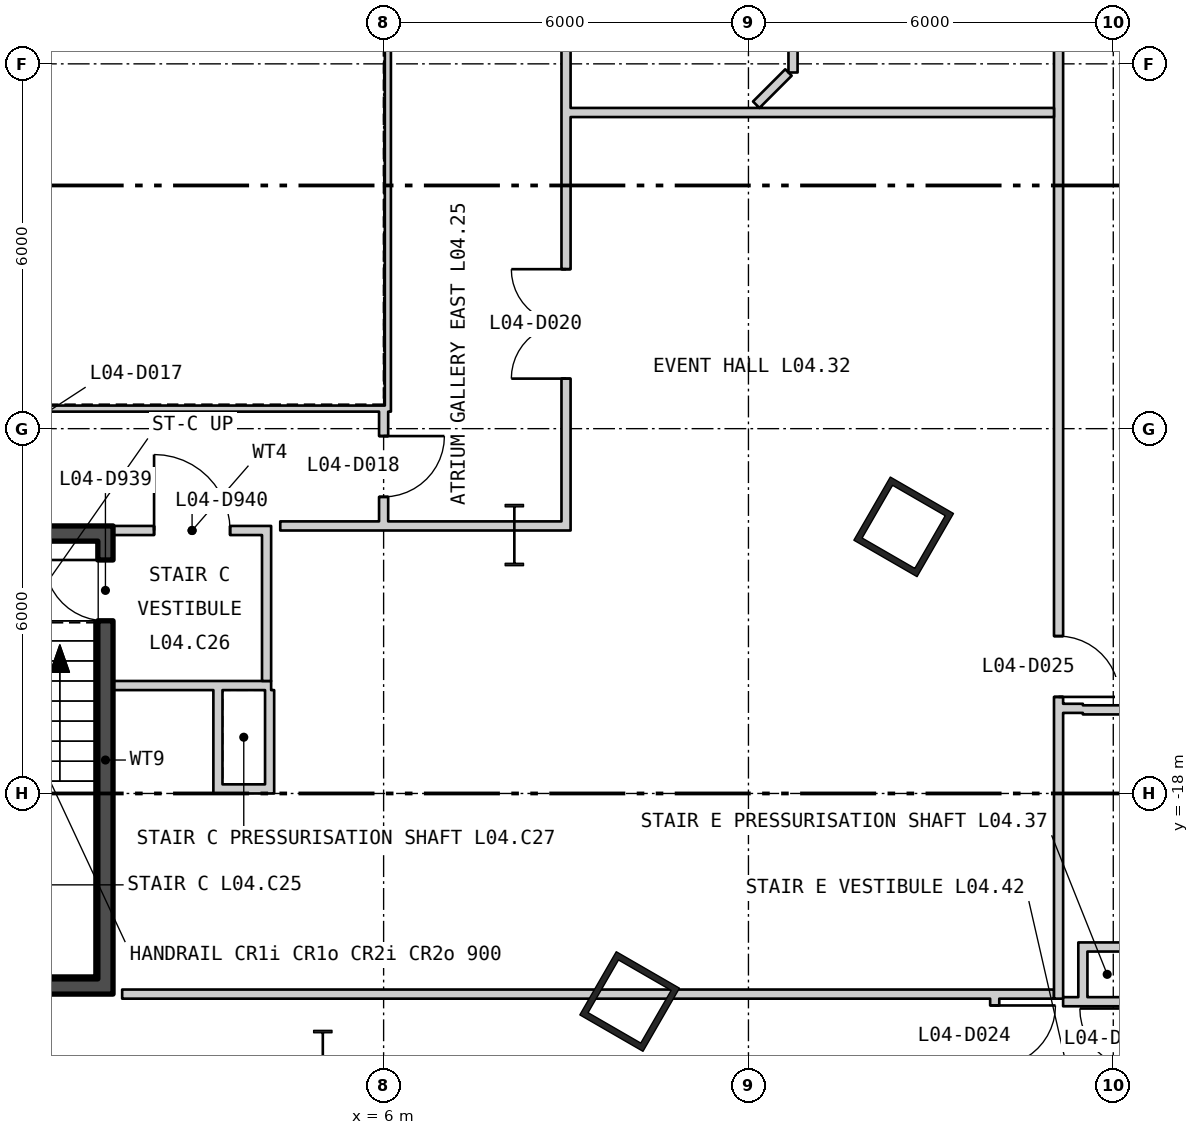
"""IFC4 building model, lengths in metres.
Left out: names, types, materials, properties, quantities, classifications, styles, units other than length and angle.
Written with IfcOpenShell. Run it as: python <this file> out.ifc"""

import sys

from ifc_helpers import new_model, si_unit, direction, frame, frame_2d, origin, origin_2d, place, context, subcontext, project, spatial, rectangle, hollow_rectangle, i_section, extrude, element, fill, save


model = new_model("IFC4")
c1 = context("Model", 3, precision=1e-05, world=origin(), true_north=direction((0.0, 1.0)))
c2 = subcontext(c1, "Body", "Model", "MODEL_VIEW")
j1 = project(units=[si_unit("LENGTHUNIT", "METRE"), si_unit("PLANEANGLEUNIT", "RADIAN")], contexts=[c1])
p1 = place(None, origin())
s1 = spatial("IfcSite", under=j1, at=p1, CompositionType="ELEMENT")
p2 = place(p1, origin())
s2 = spatial("IfcBuilding", under=s1, at=p2, CompositionType="ELEMENT")
p3 = place(p2, frame((0.0, 0.0, 23.7)))
s3 = spatial("IfcBuildingStorey", under=s2, at=p3, CompositionType="ELEMENT", Elevation=23.7)
for number, where, z_axis, x_axis in (
    (1, (10.046, -21.422, 0.0), (0.0, 0.0, 1.0), (0.5, 0.866, 0.0)),
    (2, (14.553, -13.615, 0.0), (0.0, 0.0, 1.0), (0.5, 0.866, 0.0)),
):
    element("IfcColumn", number, at=place(p3, frame(where, z_axis=z_axis, x_axis=x_axis)), inside=s3, PredefinedType="COLUMN", context=c2, shape_type="SweptSolid", body=[
        extrude(hollow_rectangle(XDim=1.2, YDim=1.2, WallThickness=0.1, at=origin_2d()), origin(), (0.0, 0.0, 1.0), 5.1),
    ])
for number, where, z_axis, x_axis in (
    (3, (8.15, -13.75, 0.0), (0.0, 0.0, 1.0), (1.0, 0.0, 0.0)),
    (4, (5.0, -22.4, 0.0), (0.0, 0.0, 1.0), (1.0, 0.0, 0.0)),
):
    element("IfcColumn", number, at=place(p3, frame(where, z_axis=z_axis, x_axis=x_axis)), inside=s3, PredefinedType="COLUMN", context=c2, shape_type="SweptSolid", body=[
        extrude(i_section(OverallWidth=0.302, OverallDepth=1.008, WebThickness=0.021, FlangeThickness=0.04, at=origin_2d()), origin(), (0.0, 0.0, 1.0), 5.1),
    ])
p4 = place(p3, frame((-6.12, -11.67, 0.0), z_axis=(0.0, 0.0, 1.0), x_axis=(1.0, 0.0, 0.0)))
e5 = element("IfcWall", 5, at=p4, inside=s3, PredefinedType="PARTITIONING", context=c2, shape_type="SweptSolid", body=[
    extrude(rectangle(XDim=12.24, YDim=0.1, at=frame_2d((6.12, 0.0))), origin(), (0.0, 0.0, 1.0), 4.85),
])
p5 = place(p3, frame((6.07, -11.62, 0.0), z_axis=(0.0, 0.0, 1.0), x_axis=(0.0, 1.0, 0.0)))
e6 = element("IfcWall", 6, at=p5, inside=s3, PredefinedType="PARTITIONING", context=c2, shape_type="SweptSolid", body=[
    extrude(rectangle(XDim=8.04, YDim=0.1, at=frame_2d((4.02, 0.0))), origin(), (0.0, 0.0, 1.0), 4.85),
])
p6 = place(p3, frame((1.425, -21.05, 0.0), z_axis=(0.0, 0.0, 1.0), x_axis=(0.0, 1.0, 0.0)))
e7 = element("IfcWall", 7, at=p6, inside=s3, PredefinedType="SHEAR", context=c2, shape_type="SweptSolid", body=[
    extrude(rectangle(XDim=7.2, YDim=0.25, at=frame_2d((3.6, 0.0))), origin(), (0.0, 0.0, 1.0), 4.85),
])
p7 = place(p6, frame((5.89, 0.0, 0.0)))
e8 = element("IfcOpeningElement", 8, at=p7, cuts=e7, PredefinedType="OPENING", context=c2, shape_type="SweptSolid", body=[
    extrude(rectangle(XDim=1.0, YDim=2.1, at=frame_2d((0.5, 1.05))), frame((0.0, 0.135, 0.0), z_axis=(0.0, -1.0, 0.0), x_axis=(1.0, 0.0, 0.0)), (0.0, 0.0, 1.0), 0.27),
])
for number, where, z_axis, x_axis in (
    (9, (-1.55, -21.175, 0.0), (0.0, 0.0, 1.0), (1.0, 0.0, 0.0)),
    (10, (-1.55, -13.725, 0.0), (0.0, 0.0, 1.0), (1.0, 0.0, 0.0)),
):
    element("IfcWall", number, at=place(p3, frame(where, z_axis=z_axis, x_axis=x_axis)), inside=s3, PredefinedType="SHEAR", context=c2, shape_type="SweptSolid", body=[
        extrude(rectangle(XDim=3.1, YDim=0.25, at=frame_2d((1.55, 0.0))), origin(), (0.0, 0.0, 1.0), 4.85),
    ])
p8 = place(p3, frame((1.55, -16.225, 0.0), z_axis=(0.0, 0.0, 1.0), x_axis=(1.0, 0.0, 0.0)))
e11 = element("IfcWall", 11, at=p8, inside=s3, PredefinedType="PARTITIONING", context=c2, shape_type="SweptSolid", body=[
    extrude(rectangle(XDim=2.6, YDim=0.15, at=frame_2d((1.3, 0.0))), origin(), (0.0, 0.0, 1.0), 4.85),
])
p9 = place(p3, frame((4.075, -16.15, 0.0), z_axis=(0.0, 0.0, 1.0), x_axis=(0.0, 1.0, 0.0)))
e12 = element("IfcWall", 12, at=p9, inside=s3, PredefinedType="PARTITIONING", context=c2, shape_type="SweptSolid", body=[
    extrude(rectangle(XDim=2.4, YDim=0.15, at=frame_2d((1.2, 0.0))), origin(), (0.0, 0.0, 1.0), 4.85),
])
p10 = place(p3, frame((1.55, -13.675, 0.0), z_axis=(0.0, 0.0, 1.0), x_axis=(1.0, 0.0, 0.0)))
e13 = element("IfcWall", 13, at=p10, inside=s3, PredefinedType="PARTITIONING", context=c2, shape_type="SweptSolid", body=[
    extrude(rectangle(XDim=2.6, YDim=0.15, at=frame_2d((1.3, 0.0))), origin(), (0.0, 0.0, 1.0), 3.94),
])
p11 = place(p10, frame((0.675, 0.0, 0.0)))
e14 = element("IfcOpeningElement", 14, at=p11, cuts=e13, PredefinedType="OPENING", context=c2, shape_type="SweptSolid", body=[
    extrude(rectangle(XDim=1.25, YDim=2.1, at=frame_2d((0.625, 1.05))), frame((0.0, 0.085, 0.0), z_axis=(0.0, -1.0, 0.0), x_axis=(1.0, 0.0, 0.0)), (0.0, 0.0, 1.0), 0.17),
])
p12 = place(p3, frame((3.275, -18.0, 0.0), z_axis=(0.0, 0.0, 1.0), x_axis=(0.0, 1.0, 0.0)))
e15 = element("IfcWall", 15, at=p12, inside=s3, PredefinedType="PARTITIONING", context=c2, shape_type="SweptSolid", body=[
    extrude(rectangle(XDim=1.7, YDim=0.15, at=frame_2d((0.85, 0.0))), origin(), (0.0, 0.0, 1.0), 4.25),
])
p13 = place(p3, frame((3.35, -17.925, 0.0), z_axis=(0.0, 0.0, 1.0), x_axis=(1.0, 0.0, 0.0)))
e16 = element("IfcWall", 16, at=p13, inside=s3, PredefinedType="PARTITIONING", context=c2, shape_type="SweptSolid", body=[
    extrude(rectangle(XDim=0.7, YDim=0.15, at=frame_2d((0.35, 0.0))), origin(), (0.0, 0.0, 1.0), 4.85),
])
p14 = place(p3, frame((4.125, -18.0, 0.0), z_axis=(0.0, 0.0, 1.0), x_axis=(0.0, 1.0, 0.0)))
e17 = element("IfcWall", 17, at=p14, inside=s3, PredefinedType="PARTITIONING", context=c2, shape_type="SweptSolid", body=[
    extrude(rectangle(XDim=1.7, YDim=0.15, at=frame_2d((0.85, 0.0))), origin(), (0.0, 0.0, 1.0), 4.85),
])
p15 = place(p3, frame((1.7, -21.3, 0.0), z_axis=(0.0, 0.0, 1.0), x_axis=(1.0, 0.0, 0.0)))
e18 = element("IfcWall", 18, at=p15, inside=s3, PredefinedType="PARTITIONING", context=c2, shape_type="SweptSolid", body=[
    extrude(rectangle(XDim=15.325, YDim=0.15, at=frame_2d((7.662, 0.0))), origin(), (0.0, 0.0, 1.0), 4.85),
])
p16 = place(p3, frame((4.3, -13.6, 0.0), z_axis=(0.0, 0.0, 1.0), x_axis=(1.0, 0.0, 0.0)))
e19 = element("IfcWall", 19, at=p16, inside=s3, PredefinedType="PARTITIONING", context=c2, shape_type="SweptSolid", body=[
    extrude(rectangle(XDim=3.85, YDim=0.15, at=frame_2d((1.925, 0.0))), origin(), (0.0, 0.0, 1.0), 3.94),
])
p17 = place(p3, frame((8.15, -13.6, 0.0), z_axis=(0.0, 0.0, 1.0), x_axis=(1.0, 0.0, 0.0)))
e20 = element("IfcWall", 20, at=p17, inside=s3, PredefinedType="PARTITIONING", context=c2, shape_type="SweptSolid", body=[
    extrude(rectangle(XDim=0.775, YDim=0.15, at=frame_2d((0.388, 0.0))), origin(), (0.0, 0.0, 1.0), 3.842),
])
p18 = place(p3, frame((6.0, -13.525, 0.0), z_axis=(0.0, 0.0, 1.0), x_axis=(0.0, 1.0, 0.0)))
e21 = element("IfcWall", 21, at=p18, inside=s3, PredefinedType="PARTITIONING", context=c2, shape_type="SweptSolid", body=[
    extrude(rectangle(XDim=1.805, YDim=0.15, at=frame_2d((0.902, 0.0))), origin(), (0.0, 0.0, 1.0), 4.85),
])
p19 = place(p18, frame((0.403, 0.0, 0.0)))
e22 = element("IfcOpeningElement", 22, at=p19, cuts=e21, PredefinedType="OPENING", context=c2, shape_type="SweptSolid", body=[
    extrude(rectangle(XDim=1.0, YDim=2.1, at=frame_2d((0.5, 1.05))), frame((0.0, 0.085, 0.0), z_axis=(0.0, -1.0, 0.0), x_axis=(1.0, 0.0, 0.0)), (0.0, 0.0, 1.0), 0.17),
])
p20 = place(p3, frame((9.0, -13.675, 0.0), z_axis=(0.0, 0.0, 1.0), x_axis=(0.0, 1.0, 0.0)))
e23 = element("IfcWall", 23, at=p20, inside=s3, PredefinedType="PARTITIONING", context=c2, shape_type="SweptSolid", body=[
    extrude(rectangle(XDim=11.287, YDim=0.15, at=frame_2d((5.644, 0.0))), origin(), (0.0, 0.0, 1.0), 4.85),
])
p21 = place(p20, frame((2.498, 0.0, 0.0)))
e24 = element("IfcOpeningElement", 24, at=p21, cuts=e23, PredefinedType="OPENING", context=c2, shape_type="SweptSolid", body=[
    extrude(rectangle(XDim=1.8, YDim=2.1, at=frame_2d((0.9, 1.05))), frame((0.0, 0.085, 0.0), z_axis=(0.0, -1.0, 0.0), x_axis=(1.0, 0.0, 0.0)), (0.0, 0.0, 1.0), 0.17),
])
p22 = place(p3, frame((9.075, -6.8, 0.0), z_axis=(0.0, 0.0, 1.0), x_axis=(1.0, 0.0, 0.0)))
e25 = element("IfcWall", 25, at=p22, inside=s3, PredefinedType="PARTITIONING", context=c2, shape_type="SweptSolid", body=[
    extrude(rectangle(XDim=7.95, YDim=0.15, at=frame_2d((3.975, 0.0))), origin(), (0.0, 0.0, 1.0), 4.85),
])
p23 = place(p3, frame((12.128, -6.672, 0.0), z_axis=(0.0, 0.0, 1.0), x_axis=(0.707106781187, 0.707106781187, 0.0)))
e26 = element("IfcWall", 26, at=p23, inside=s3, PredefinedType="PARTITIONING", context=c2, shape_type="SweptSolid", body=[
    extrude(rectangle(XDim=0.75, YDim=0.15, at=frame_2d((0.375, 0.0))), origin(), (0.0, 0.0, 1.0), 4.85),
])
p24 = place(p3, frame((12.733, -6.142, 0.0), z_axis=(0.0, 0.0, 1.0), x_axis=(0.0, 1.0, 0.0)))
e27 = element("IfcWall", 27, at=p24, inside=s3, PredefinedType="PARTITIONING", context=c2, shape_type="SweptSolid", body=[
    extrude(rectangle(XDim=3.042, YDim=0.15, at=frame_2d((1.521, 0.0))), origin(), (0.0, 0.0, 1.0), 4.16),
])
p25 = place(p3, frame((16.05, -23.55, 0.0), z_axis=(0.0, 0.0, 1.0), x_axis=(0.0, 1.0, 0.0)))
e28 = element("IfcWall", 28, at=p25, inside=s3, PredefinedType="PARTITIONING", context=c2, shape_type="SweptSolid", body=[
    extrude(rectangle(XDim=2.175, YDim=0.15, at=frame_2d((1.087, 0.0))), origin(), (0.0, 0.0, 1.0), 4.16),
])
p26 = place(p25, frame((1.063, 0.0, 0.0)))
e29 = element("IfcOpeningElement", 29, at=p26, cuts=e28, PredefinedType="OPENING", context=c2, shape_type="SweptSolid", body=[
    extrude(rectangle(XDim=1.0, YDim=2.1, at=frame_2d((0.5, 1.05))), frame((0.0, 0.085, 0.0), z_axis=(0.0, -1.0, 0.0), x_axis=(1.0, 0.0, 0.0)), (0.0, 0.0, 1.0), 0.17),
])
p27 = place(p3, frame((17.1, -21.375, 0.0), z_axis=(0.0, 0.0, 1.0), x_axis=(0.0, 1.0, 0.0)))
e30 = element("IfcWall", 30, at=p27, inside=s3, PredefinedType="PARTITIONING", context=c2, shape_type="SweptSolid", body=[
    extrude(rectangle(XDim=19.05, YDim=0.15, at=frame_2d((9.525, 0.0))), origin(), (0.0, 0.0, 1.0), 4.85),
])
p28 = place(p27, frame((4.963, 0.0, 0.0)))
e31 = element("IfcOpeningElement", 31, at=p28, cuts=e30, PredefinedType="OPENING", context=c2, shape_type="SweptSolid", body=[
    extrude(rectangle(XDim=1.0, YDim=2.1, at=frame_2d((0.5, 1.05))), frame((0.0, 0.085, 0.0), z_axis=(0.0, -1.0, 0.0), x_axis=(1.0, 0.0, 0.0)), (0.0, 0.0, 1.0), 0.17),
])
p29 = place(p3, frame((17.175, -21.425, 0.0), z_axis=(0.0, 0.0, 1.0), x_axis=(1.0, 0.0, 0.0)))
e32 = element("IfcWall", 32, at=p29, inside=s3, PredefinedType="PARTITIONING", context=c2, shape_type="SweptSolid", body=[
    extrude(rectangle(XDim=0.25, YDim=0.15, at=frame_2d((0.125, 0.0))), origin(), (0.0, 0.0, 1.0), 4.85),
])
p30 = place(p3, frame((17.175, -16.6, 0.0), z_axis=(0.0, 0.0, 1.0), x_axis=(1.0, 0.0, 0.0)))
e33 = element("IfcWall", 33, at=p30, inside=s3, PredefinedType="PARTITIONING", context=c2, shape_type="SweptSolid", body=[
    extrude(rectangle(XDim=0.325, YDim=0.15, at=frame_2d((0.163, 0.0))), origin(), (0.0, 0.0, 1.0), 4.85),
])
p31 = place(p3, frame((17.5, -21.5, 0.0), z_axis=(0.0, 0.0, 1.0), x_axis=(0.0, 1.0, 0.0)))
e34 = element("IfcWall", 34, at=p31, inside=s3, PredefinedType="PARTITIONING", context=c2, shape_type="SweptSolid", body=[
    extrude(rectangle(XDim=1.05, YDim=0.15, at=frame_2d((0.525, 0.0))), origin(), (0.0, 0.0, 1.0), 4.85),
])
p32 = place(p3, frame((17.5, -16.625, 0.0), z_axis=(0.0, 0.0, 1.0), x_axis=(1.0, 0.0, 0.0)))
e35 = element("IfcWall", 35, at=p32, inside=s3, PredefinedType="PARTITIONING", context=c2, shape_type="SweptSolid", body=[
    extrude(rectangle(XDim=2.325, YDim=0.15, at=frame_2d((1.163, 0.0))), origin(), (0.0, 0.0, 1.0), 4.85),
])
p33 = place(p32, frame((0.662, 0.0, 0.0)))
e36 = element("IfcOpeningElement", 36, at=p33, cuts=e35, PredefinedType="OPENING", context=c2, shape_type="SweptSolid", body=[
    extrude(rectangle(XDim=1.0, YDim=2.1, at=frame_2d((0.5, 1.05))), frame((0.0, 0.085, 0.0), z_axis=(0.0, -1.0, 0.0), x_axis=(1.0, 0.0, 0.0)), (0.0, 0.0, 1.0), 0.17),
])
for number, where, z_axis, x_axis in (
    (37, (17.575, -21.425, 0.0), (0.0, 0.0, 1.0), (1.0, 0.0, 0.0)),
    (38, (17.575, -20.525, 0.0), (0.0, 0.0, 1.0), (1.0, 0.0, 0.0)),
):
    element("IfcWall", number, at=place(p3, frame(where, z_axis=z_axis, x_axis=x_axis)), inside=s3, PredefinedType="PARTITIONING", context=c2, shape_type="SweptSolid", body=[
        extrude(rectangle(XDim=0.65, YDim=0.15, at=frame_2d((0.325, 0.0))), origin(), (0.0, 0.0, 1.0), 4.85),
    ])
p34 = place(p7, origin())
e39 = element("IfcDoor", 39, at=p34, inside=s3, OperationType="SINGLE_SWING_LEFT", PredefinedType="DOOR", context=c2, shape_type="SweptSolid", body=[
    extrude(rectangle(XDim=1.0, YDim=2.1, at=frame_2d((0.5, 1.05))), frame((0.0, 0.025, 0.0), z_axis=(0.0, -1.0, 0.0), x_axis=(1.0, 0.0, 0.0)), (0.0, 0.0, 1.0), 0.05),
])
fill(e8, e39)
p35 = place(p11, origin())
e40 = element("IfcDoor", 40, at=p35, inside=s3, OperationType="SINGLE_SWING_RIGHT", PredefinedType="DOOR", context=c2, shape_type="SweptSolid", body=[
    extrude(rectangle(XDim=1.25, YDim=2.1, at=frame_2d((0.625, 1.05))), frame((0.0, 0.025, 0.0), z_axis=(0.0, -1.0, 0.0), x_axis=(1.0, 0.0, 0.0)), (0.0, 0.0, 1.0), 0.05),
])
fill(e14, e40)
p36 = place(p19, origin())
e41 = element("IfcDoor", 41, at=p36, inside=s3, OperationType="SINGLE_SWING_RIGHT", PredefinedType="DOOR", context=c2, shape_type="SweptSolid", body=[
    extrude(rectangle(XDim=1.0, YDim=2.1, at=frame_2d((0.5, 1.05))), frame((0.0, 0.025, 0.0), z_axis=(0.0, -1.0, 0.0), x_axis=(1.0, 0.0, 0.0)), (0.0, 0.0, 1.0), 0.05),
])
fill(e22, e41)
p37 = place(p21, origin())
e42 = element("IfcDoor", 42, at=p37, inside=s3, OperationType="DOUBLE_DOOR_SINGLE_SWING", PredefinedType="DOOR", context=c2, shape_type="SweptSolid", body=[
    extrude(rectangle(XDim=1.8, YDim=2.1, at=frame_2d((0.9, 1.05))), frame((0.0, 0.025, 0.0), z_axis=(0.0, -1.0, 0.0), x_axis=(1.0, 0.0, 0.0)), (0.0, 0.0, 1.0), 0.05),
])
fill(e24, e42)
p38 = place(p26, origin())
e43 = element("IfcDoor", 43, at=p38, inside=s3, OperationType="SINGLE_SWING_RIGHT", PredefinedType="DOOR", context=c2, shape_type="SweptSolid", body=[
    extrude(rectangle(XDim=1.0, YDim=2.1, at=frame_2d((0.5, 1.05))), frame((0.0, 0.025, 0.0), z_axis=(0.0, -1.0, 0.0), x_axis=(1.0, 0.0, 0.0)), (0.0, 0.0, 1.0), 0.05),
])
fill(e29, e43)
p39 = place(p28, origin())
e44 = element("IfcDoor", 44, at=p39, inside=s3, OperationType="SINGLE_SWING_LEFT", PredefinedType="DOOR", context=c2, shape_type="SweptSolid", body=[
    extrude(rectangle(XDim=1.0, YDim=2.1, at=frame_2d((0.5, 1.05))), frame((0.0, 0.025, 0.0), z_axis=(0.0, -1.0, 0.0), x_axis=(1.0, 0.0, 0.0)), (0.0, 0.0, 1.0), 0.05),
])
fill(e31, e44)
save(model, sys.argv[1])
